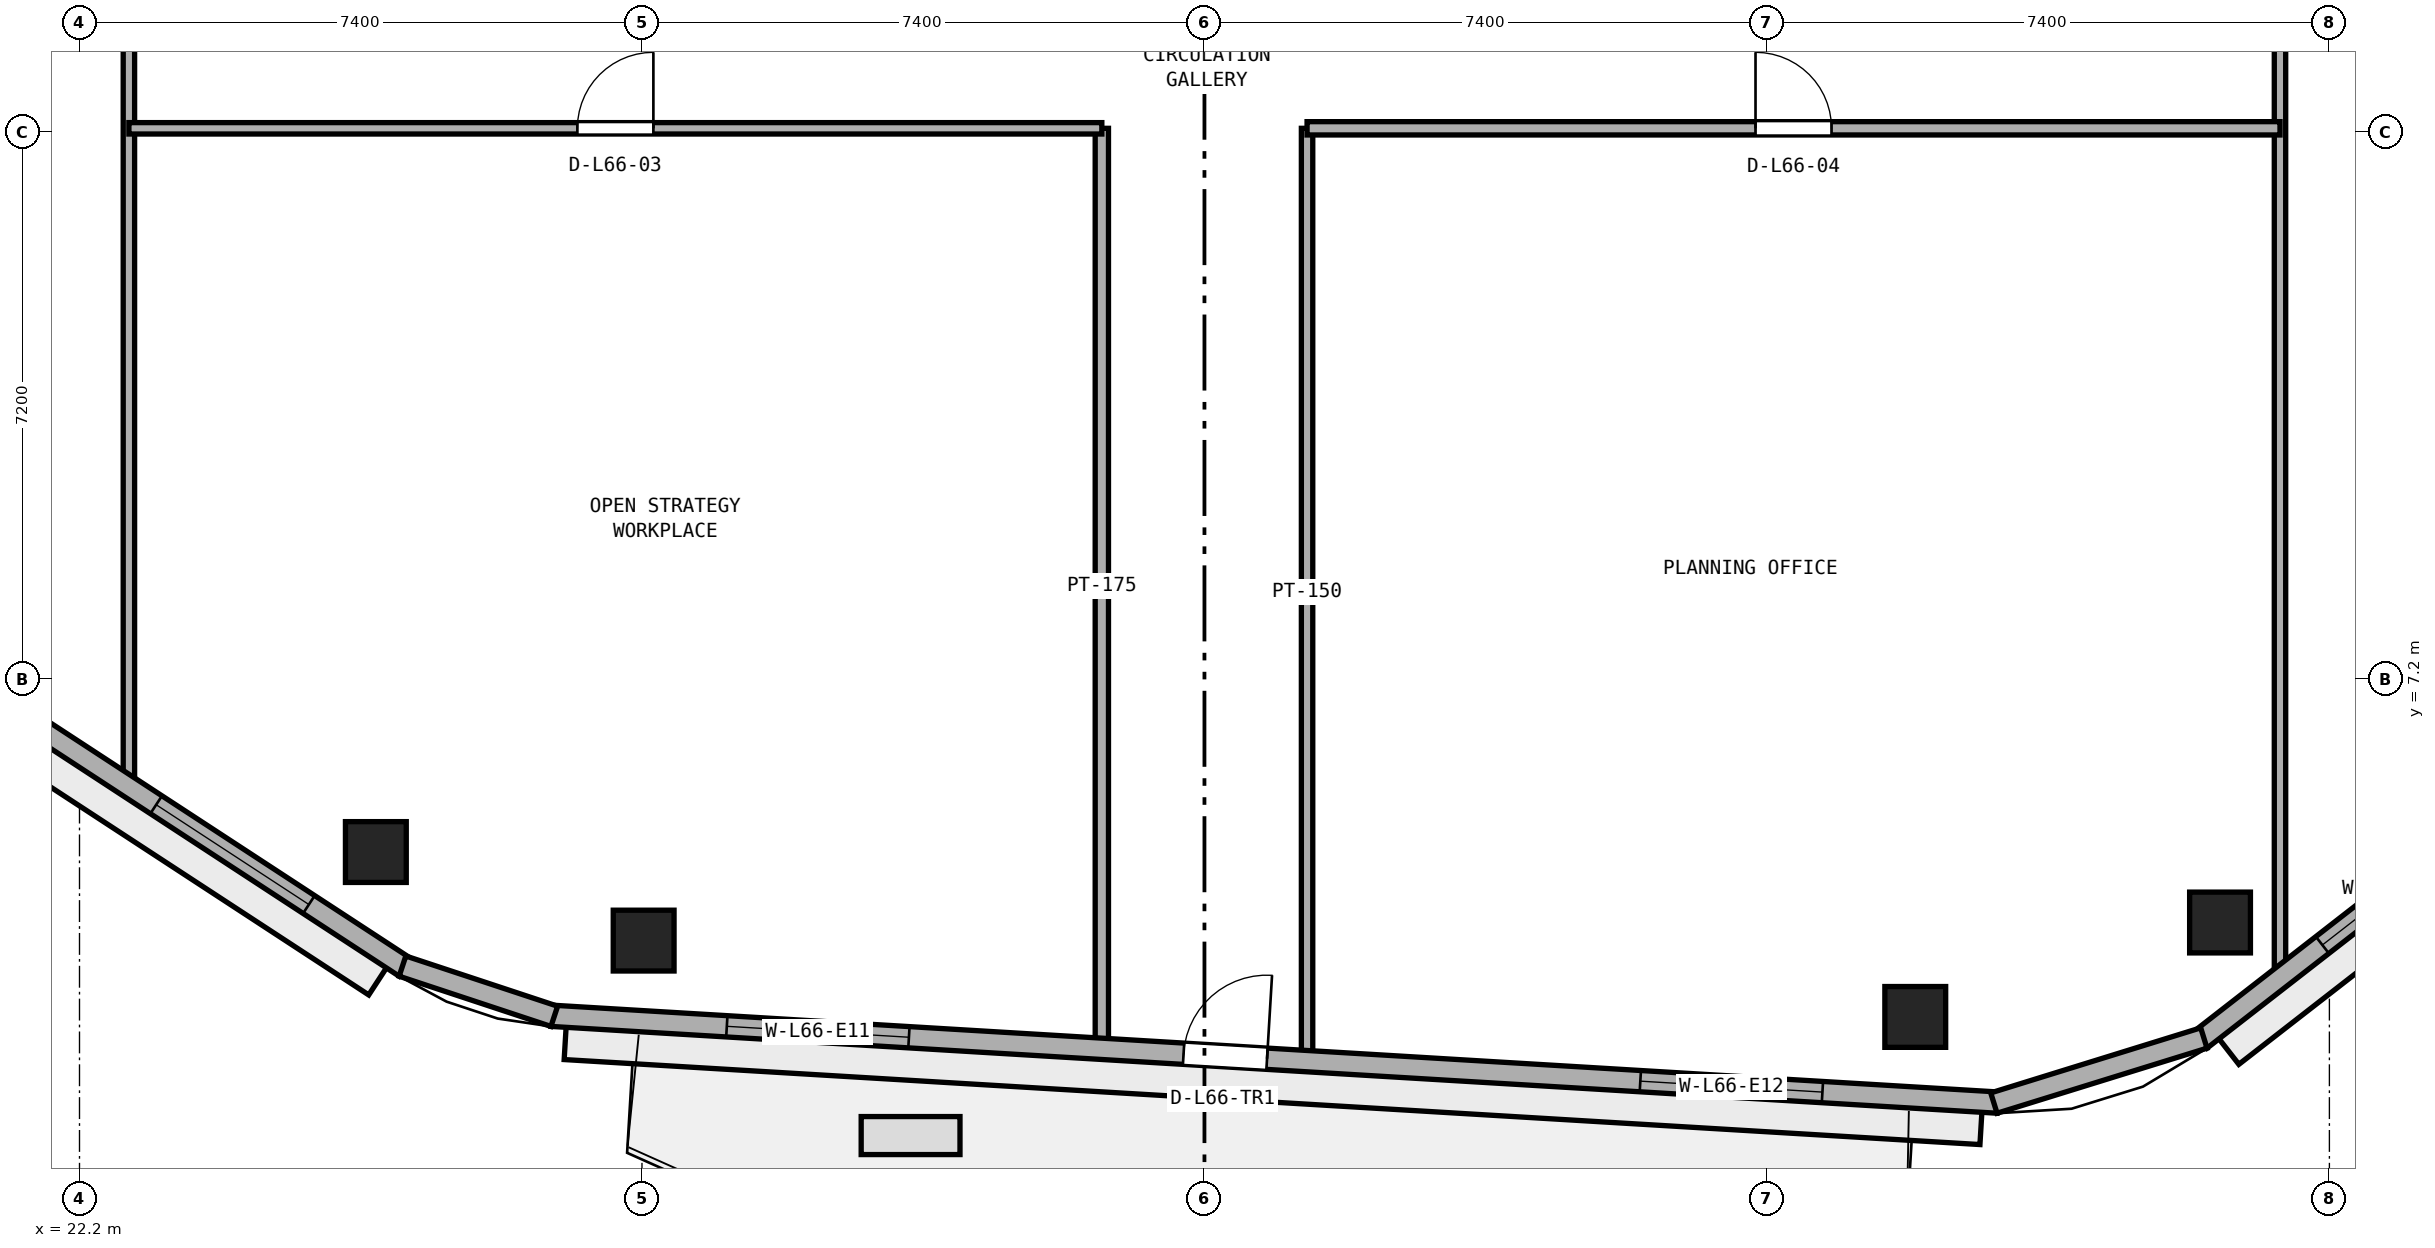
"""IFC4 building model, lengths in metres.
Left out: names, types, materials, properties, quantities, classifications, styles, units other than length and angle.
Written with IfcOpenShell. Run it as: python <this file> out.ifc"""

import sys

from ifc_helpers import new_model, si_unit, direction, frame, frame_2d, origin, origin_2d, place, context, subcontext, project, spatial, rectangle, extrude, element, fill, save


model = new_model("IFC4")
c1 = context("Model", 3, precision=1e-05, world=origin(), true_north=direction((0.0, 1.0)))
c2 = subcontext(c1, "Body", "Model", "MODEL_VIEW")
j1 = project(units=[si_unit("LENGTHUNIT", "METRE"), si_unit("PLANEANGLEUNIT", "RADIAN")], contexts=[c1])
p1 = place(None, origin())
s1 = spatial("IfcSite", under=j1, at=p1, CompositionType="ELEMENT")
p2 = place(p1, origin())
s2 = spatial("IfcBuilding", under=s1, at=p2, CompositionType="ELEMENT")
p3 = place(p2, frame((0.0, 0.0, 259.2)))
s3 = spatial("IfcBuildingStorey", under=s2, at=p3, CompositionType="ELEMENT", Elevation=259.2)
for number, where, z_axis, x_axis in (
    (1, (29.622, 3.764, 0.0), (0.0, 0.0, 1.0), (1.0, 0.0, 0.0)),
    (2, (46.352, 2.76, 0.0), (0.0, 0.0, 1.0), (1.0, 0.0, 0.0)),
    (3, (50.361, 4.002, 0.0), (0.0, 0.0, 1.0), (1.0, 0.0, 0.0)),
    (4, (26.099, 4.929, 0.0), (0.0, 0.0, 1.0), (1.0, 0.0, 0.0)),
):
    element("IfcColumn", number, at=place(p3, frame(where, z_axis=z_axis, x_axis=x_axis)), inside=s3, PredefinedType="COLUMN", context=c2, shape_type="SweptSolid", body=[
        extrude(rectangle(XDim=0.8, YDim=0.8, at=origin_2d()), origin(), (0.0, 0.0, 1.0), 3.8),
    ])
p4 = place(p3, frame((51.15, 3.235, 0.0), z_axis=(0.0, 0.0, 1.0), x_axis=(0.0, 1.0, 0.0)))
e5 = element("IfcWall", 5, at=p4, inside=s3, PredefinedType="PARTITIONING", context=c2, shape_type="SweptSolid", body=[
    extrude(rectangle(XDim=24.565, YDim=0.15, at=frame_2d((12.283, 0.0))), origin(), (0.0, 0.0, 1.0), 3.51),
])
p5 = place(p4, frame((17.27, 0.0, 0.0)))
e6 = element("IfcOpeningElement", 6, at=p5, cuts=e5, PredefinedType="OPENING", context=c2, shape_type="SweptSolid", body=[
    extrude(rectangle(XDim=1.0, YDim=2.12, at=frame_2d((0.5, 1.06))), frame((0.0, 0.085, 0.0), z_axis=(0.0, -1.0, 0.0), x_axis=(1.0, 0.0, 0.0)), (0.0, 0.0, 1.0), 0.17),
])
p6 = place(p3, frame((38.35, 2.243, 0.0), z_axis=(0.0, 0.0, 1.0), x_axis=(0.0, 1.0, 0.0)))
e7 = element("IfcWall", 7, at=p6, inside=s3, PredefinedType="PARTITIONING", context=c2, shape_type="SweptSolid", body=[
    extrude(rectangle(XDim=12.207, YDim=0.15, at=frame_2d((6.104, 0.0))), origin(), (0.0, 0.0, 1.0), 3.51),
])
p7 = place(p3, frame((35.65, 2.405, 0.0), z_axis=(0.0, 0.0, 1.0), x_axis=(0.0, 1.0, 0.0)))
e8 = element("IfcWall", 8, at=p7, inside=s3, PredefinedType="PARTITIONING", context=c2, shape_type="SweptSolid", body=[
    extrude(rectangle(XDim=12.045, YDim=0.175, at=frame_2d((6.022, 0.0))), origin(), (0.0, 0.0, 1.0), 3.51),
])
p8 = place(p3, frame((22.85, 5.758, 0.0), z_axis=(0.0, 0.0, 1.0), x_axis=(0.0, 1.0, 0.0)))
e9 = element("IfcWall", 9, at=p8, inside=s3, PredefinedType="PARTITIONING", context=c2, shape_type="SweptSolid", body=[
    extrude(rectangle(XDim=38.65, YDim=0.15, at=frame_2d((19.325, 0.0))), origin(), (0.0, 0.0, 1.0), 3.51),
])
p9 = place(p8, frame((11.367, 0.0, 0.0)))
e10 = element("IfcOpeningElement", 10, at=p9, cuts=e9, PredefinedType="OPENING", context=c2, shape_type="SweptSolid", body=[
    extrude(rectangle(XDim=0.9, YDim=2.1, at=frame_2d((0.45, 1.05))), frame((0.0, 0.085, 0.0), z_axis=(0.0, -1.0, 0.0), x_axis=(1.0, 0.0, 0.0)), (0.0, 0.0, 1.0), 0.17),
])
p10 = place(p8, frame((18.242, 0.0, 0.0)))
e11 = element("IfcOpeningElement", 11, at=p10, cuts=e9, PredefinedType="OPENING", context=c2, shape_type="SweptSolid", body=[
    extrude(rectangle(XDim=0.9, YDim=2.1, at=frame_2d((0.45, 1.05))), frame((0.0, 0.085, 0.0), z_axis=(0.0, -1.0, 0.0), x_axis=(1.0, 0.0, 0.0)), (0.0, 0.0, 1.0), 0.17),
])
p11 = place(p8, frame((25.867, 0.0, 0.0)))
e12 = element("IfcOpeningElement", 12, at=p11, cuts=e9, PredefinedType="OPENING", context=c2, shape_type="SweptSolid", body=[
    extrude(rectangle(XDim=0.9, YDim=2.1, at=frame_2d((0.45, 1.05))), frame((0.0, 0.085, 0.0), z_axis=(0.0, -1.0, 0.0), x_axis=(1.0, 0.0, 0.0)), (0.0, 0.0, 1.0), 0.17),
])
p12 = place(p3, frame((22.85, 14.45, 0.0), z_axis=(0.0, 0.0, 1.0), x_axis=(1.0, 0.0, 0.0)))
e13 = element("IfcWall", 13, at=p12, inside=s3, PredefinedType="PARTITIONING", context=c2, shape_type="SweptSolid", body=[
    extrude(rectangle(XDim=12.8, YDim=0.15, at=frame_2d((6.4, 0.0))), origin(), (0.0, 0.0, 1.0), 3.51),
])
p13 = place(p12, frame((5.9, 0.0, 0.0)))
e14 = element("IfcOpeningElement", 14, at=p13, cuts=e13, PredefinedType="OPENING", context=c2, shape_type="SweptSolid", body=[
    extrude(rectangle(XDim=1.0, YDim=2.12, at=frame_2d((0.5, 1.06))), frame((0.0, 0.085, 0.0), z_axis=(0.0, -1.0, 0.0), x_axis=(1.0, 0.0, 0.0)), (0.0, 0.0, 1.0), 0.17),
])
p14 = place(p3, frame((38.35, 14.45, 0.0), z_axis=(0.0, 0.0, 1.0), x_axis=(1.0, 0.0, 0.0)))
e15 = element("IfcWall", 15, at=p14, inside=s3, PredefinedType="PARTITIONING", context=c2, shape_type="SweptSolid", body=[
    extrude(rectangle(XDim=12.8, YDim=0.175, at=frame_2d((6.4, 0.0))), origin(), (0.0, 0.0, 1.0), 3.51),
])
p15 = place(p14, frame((5.9, 0.0, 0.0)))
e16 = element("IfcOpeningElement", 16, at=p15, cuts=e15, PredefinedType="OPENING", context=c2, shape_type="SweptSolid", body=[
    extrude(rectangle(XDim=1.0, YDim=2.12, at=frame_2d((0.5, 1.06))), frame((0.0, 0.097, 0.0), z_axis=(0.0, -1.0, 0.0), x_axis=(1.0, 0.0, 0.0)), (0.0, 0.0, 1.0), 0.195),
])
p16 = place(p3, frame((28.411, 2.774, 0.0), z_axis=(0.0, 0.0, 1.0), x_axis=(0.998203068368, -0.059921901676, 0.0)))
e17 = element("IfcWall", 17, at=p16, inside=s3, PredefinedType="STANDARD", context=c2, shape_type="SweptSolid", body=[
    extrude(rectangle(XDim=19.06, YDim=0.28, at=frame_2d((9.53, 0.0))), origin(), (0.0, 0.0, 1.0), 3.51),
])
p17 = place(p16, frame((8.33, 0.0, 0.0)))
e18 = element("IfcOpeningElement", 18, at=p17, cuts=e17, PredefinedType="OPENING", context=c2, shape_type="SweptSolid", body=[
    extrude(rectangle(XDim=1.1, YDim=2.2, at=frame_2d((0.55, 1.1))), frame((0.0, 0.15, 0.0), z_axis=(0.0, -1.0, 0.0), x_axis=(1.0, 0.0, 0.0)), (0.0, 0.0, 1.0), 0.3),
])
p18 = place(p16, frame((2.31, 0.0, 0.9)))
e19 = element("IfcOpeningElement", 19, at=p18, cuts=e17, PredefinedType="OPENING", context=c2, shape_type="SweptSolid", body=[
    extrude(rectangle(XDim=2.4, YDim=1.75, at=frame_2d((1.2, 0.875))), frame((0.0, 0.15, 0.0), z_axis=(0.0, -1.0, 0.0), x_axis=(1.0, 0.0, 0.0)), (0.0, 0.0, 1.0), 0.3),
])
p19 = place(p16, frame((14.35, 0.0, 0.9)))
e20 = element("IfcOpeningElement", 20, at=p19, cuts=e17, PredefinedType="OPENING", context=c2, shape_type="SweptSolid", body=[
    extrude(rectangle(XDim=2.4, YDim=1.75, at=frame_2d((1.2, 0.875))), frame((0.0, 0.15, 0.0), z_axis=(0.0, -1.0, 0.0), x_axis=(1.0, 0.0, 0.0)), (0.0, 0.0, 1.0), 0.3),
])
p20 = place(p3, frame((50.104, 2.459, 0.0), z_axis=(0.0, 0.0, 1.0), x_axis=(0.789464857485, 0.613795763097, 0.0)))
e21 = element("IfcWall", 21, at=p20, inside=s3, PredefinedType="STANDARD", context=c2, shape_type="SweptSolid", body=[
    extrude(rectangle(XDim=17.387, YDim=0.28, at=frame_2d((8.694, 0.0))), origin(), (0.0, 0.0, 1.0), 3.51),
])
p21 = place(p20, frame((2.031, 0.0, 0.9)))
e22 = element("IfcOpeningElement", 22, at=p21, cuts=e21, PredefinedType="OPENING", context=c2, shape_type="SweptSolid", body=[
    extrude(rectangle(XDim=2.4, YDim=1.75, at=frame_2d((1.2, 0.875))), frame((0.0, 0.15, 0.0), z_axis=(0.0, -1.0, 0.0), x_axis=(1.0, 0.0, 0.0)), (0.0, 0.0, 1.0), 0.3),
])
p22 = place(p20, frame((7.494, 0.0, 0.9)))
e23 = element("IfcOpeningElement", 23, at=p22, cuts=e21, PredefinedType="OPENING", context=c2, shape_type="SweptSolid", body=[
    extrude(rectangle(XDim=2.4, YDim=1.75, at=frame_2d((1.2, 0.875))), frame((0.0, 0.15, 0.0), z_axis=(0.0, -1.0, 0.0), x_axis=(1.0, 0.0, 0.0)), (0.0, 0.0, 1.0), 0.3),
])
p23 = place(p20, frame((12.956, 0.0, 0.9)))
e24 = element("IfcOpeningElement", 24, at=p23, cuts=e21, PredefinedType="OPENING", context=c2, shape_type="SweptSolid", body=[
    extrude(rectangle(XDim=2.4, YDim=1.75, at=frame_2d((1.2, 0.875))), frame((0.0, 0.15, 0.0), z_axis=(0.0, -1.0, 0.0), x_axis=(1.0, 0.0, 0.0)), (0.0, 0.0, 1.0), 0.3),
])
p24 = place(p3, frame((12.034, 12.854, 0.0), z_axis=(0.0, 0.0, 1.0), x_axis=(0.837118352984, -0.547021812269, 0.0)))
e25 = element("IfcWall", 25, at=p24, inside=s3, PredefinedType="STANDARD", context=c2, shape_type="SweptSolid", body=[
    extrude(rectangle(XDim=17.259, YDim=0.28, at=frame_2d((8.63, 0.0))), origin(), (0.0, 0.0, 1.0), 3.51),
])
p25 = place(p24, frame((2.01, 0.0, 0.9)))
e26 = element("IfcOpeningElement", 26, at=p25, cuts=e25, PredefinedType="OPENING", context=c2, shape_type="SweptSolid", body=[
    extrude(rectangle(XDim=2.4, YDim=1.75, at=frame_2d((1.2, 0.875))), frame((0.0, 0.15, 0.0), z_axis=(0.0, -1.0, 0.0), x_axis=(1.0, 0.0, 0.0)), (0.0, 0.0, 1.0), 0.3),
])
p26 = place(p24, frame((7.43, 0.0, 0.9)))
e27 = element("IfcOpeningElement", 27, at=p26, cuts=e25, PredefinedType="OPENING", context=c2, shape_type="SweptSolid", body=[
    extrude(rectangle(XDim=2.4, YDim=1.75, at=frame_2d((1.2, 0.875))), frame((0.0, 0.15, 0.0), z_axis=(0.0, -1.0, 0.0), x_axis=(1.0, 0.0, 0.0)), (0.0, 0.0, 1.0), 0.3),
])
p27 = place(p24, frame((13.349, 0.0, 0.9)))
e28 = element("IfcOpeningElement", 28, at=p27, cuts=e25, PredefinedType="OPENING", context=c2, shape_type="SweptSolid", body=[
    extrude(rectangle(XDim=2.4, YDim=1.75, at=frame_2d((1.2, 0.875))), frame((0.0, 0.15, 0.0), z_axis=(0.0, -1.0, 0.0), x_axis=(1.0, 0.0, 0.0)), (0.0, 0.0, 1.0), 0.3),
])
p28 = place(p3, frame((47.386, 1.626, 0.0), z_axis=(0.0, 0.0, 1.0), x_axis=(0.955189316149, 0.29599555793, 0.0)))
e29 = element("IfcWall", 29, at=p28, inside=s3, PredefinedType="STANDARD", context=c2, shape_type="SweptSolid", body=[
    extrude(rectangle(XDim=2.892, YDim=0.28, at=frame_2d((1.446, 0.0))), origin(), (0.0, 0.0, 1.0), 3.51),
])
p29 = place(p3, frame((26.449, 3.428, 0.0), z_axis=(0.0, 0.0, 1.0), x_axis=(0.949435039229, -0.313963542923, 0.0)))
e30 = element("IfcWall", 30, at=p29, inside=s3, PredefinedType="STANDARD", context=c2, shape_type="SweptSolid", body=[
    extrude(rectangle(XDim=2.104, YDim=0.28, at=frame_2d((1.052, 0.0))), origin(), (0.0, 0.0, 1.0), 3.51),
])
p30 = place(p13, origin())
e31 = element("IfcDoor", 31, at=p30, inside=s3, OperationType="SINGLE_SWING_RIGHT", PredefinedType="DOOR", context=c2, shape_type="SweptSolid", body=[
    extrude(rectangle(XDim=1.0, YDim=2.12, at=frame_2d((0.5, 1.06))), frame((0.0, 0.025, 0.0), z_axis=(0.0, -1.0, 0.0), x_axis=(1.0, 0.0, 0.0)), (0.0, 0.0, 1.0), 0.05),
])
fill(e14, e31)
p31 = place(p15, origin())
e32 = element("IfcDoor", 32, at=p31, inside=s3, OperationType="SINGLE_SWING_LEFT", PredefinedType="DOOR", context=c2, shape_type="SweptSolid", body=[
    extrude(rectangle(XDim=1.0, YDim=2.12, at=frame_2d((0.5, 1.06))), frame((0.0, 0.025, 0.0), z_axis=(0.0, -1.0, 0.0), x_axis=(1.0, 0.0, 0.0)), (0.0, 0.0, 1.0), 0.05),
])
fill(e16, e32)
p32 = place(p17, origin())
e33 = element("IfcDoor", 33, at=p32, inside=s3, OperationType="SINGLE_SWING_RIGHT", PredefinedType="DOOR", context=c2, shape_type="SweptSolid", body=[
    extrude(rectangle(XDim=1.1, YDim=2.2, at=frame_2d((0.55, 1.1))), frame((0.0, 0.025, 0.0), z_axis=(0.0, -1.0, 0.0), x_axis=(1.0, 0.0, 0.0)), (0.0, 0.0, 1.0), 0.05),
])
fill(e18, e33)
p33 = place(p18, origin())
e34 = element("IfcWindow", 34, at=p33, inside=s3, PartitioningType="SINGLE_PANEL", PredefinedType="WINDOW", context=c2, shape_type="SweptSolid", body=[
    extrude(rectangle(XDim=2.4, YDim=1.75, at=frame_2d((1.2, 0.875))), frame((0.0, 0.03, 0.0), z_axis=(0.0, -1.0, 0.0), x_axis=(1.0, 0.0, 0.0)), (0.0, 0.0, 1.0), 0.06),
])
fill(e19, e34)
p34 = place(p19, origin())
e35 = element("IfcWindow", 35, at=p34, inside=s3, PartitioningType="SINGLE_PANEL", PredefinedType="WINDOW", context=c2, shape_type="SweptSolid", body=[
    extrude(rectangle(XDim=2.4, YDim=1.75, at=frame_2d((1.2, 0.875))), frame((0.0, 0.03, 0.0), z_axis=(0.0, -1.0, 0.0), x_axis=(1.0, 0.0, 0.0)), (0.0, 0.0, 1.0), 0.06),
])
fill(e20, e35)
p35 = place(p21, origin())
e36 = element("IfcWindow", 36, at=p35, inside=s3, PartitioningType="SINGLE_PANEL", PredefinedType="WINDOW", context=c2, shape_type="SweptSolid", body=[
    extrude(rectangle(XDim=2.4, YDim=1.75, at=frame_2d((1.2, 0.875))), frame((0.0, 0.03, 0.0), z_axis=(0.0, -1.0, 0.0), x_axis=(1.0, 0.0, 0.0)), (0.0, 0.0, 1.0), 0.06),
])
fill(e22, e36)
p36 = place(p27, origin())
e37 = element("IfcWindow", 37, at=p36, inside=s3, PartitioningType="SINGLE_PANEL", PredefinedType="WINDOW", context=c2, shape_type="SweptSolid", body=[
    extrude(rectangle(XDim=2.4, YDim=1.75, at=frame_2d((1.2, 0.875))), frame((0.0, 0.03, 0.0), z_axis=(0.0, -1.0, 0.0), x_axis=(1.0, 0.0, 0.0)), (0.0, 0.0, 1.0), 0.06),
])
fill(e28, e37)
save(model, sys.argv[1])
